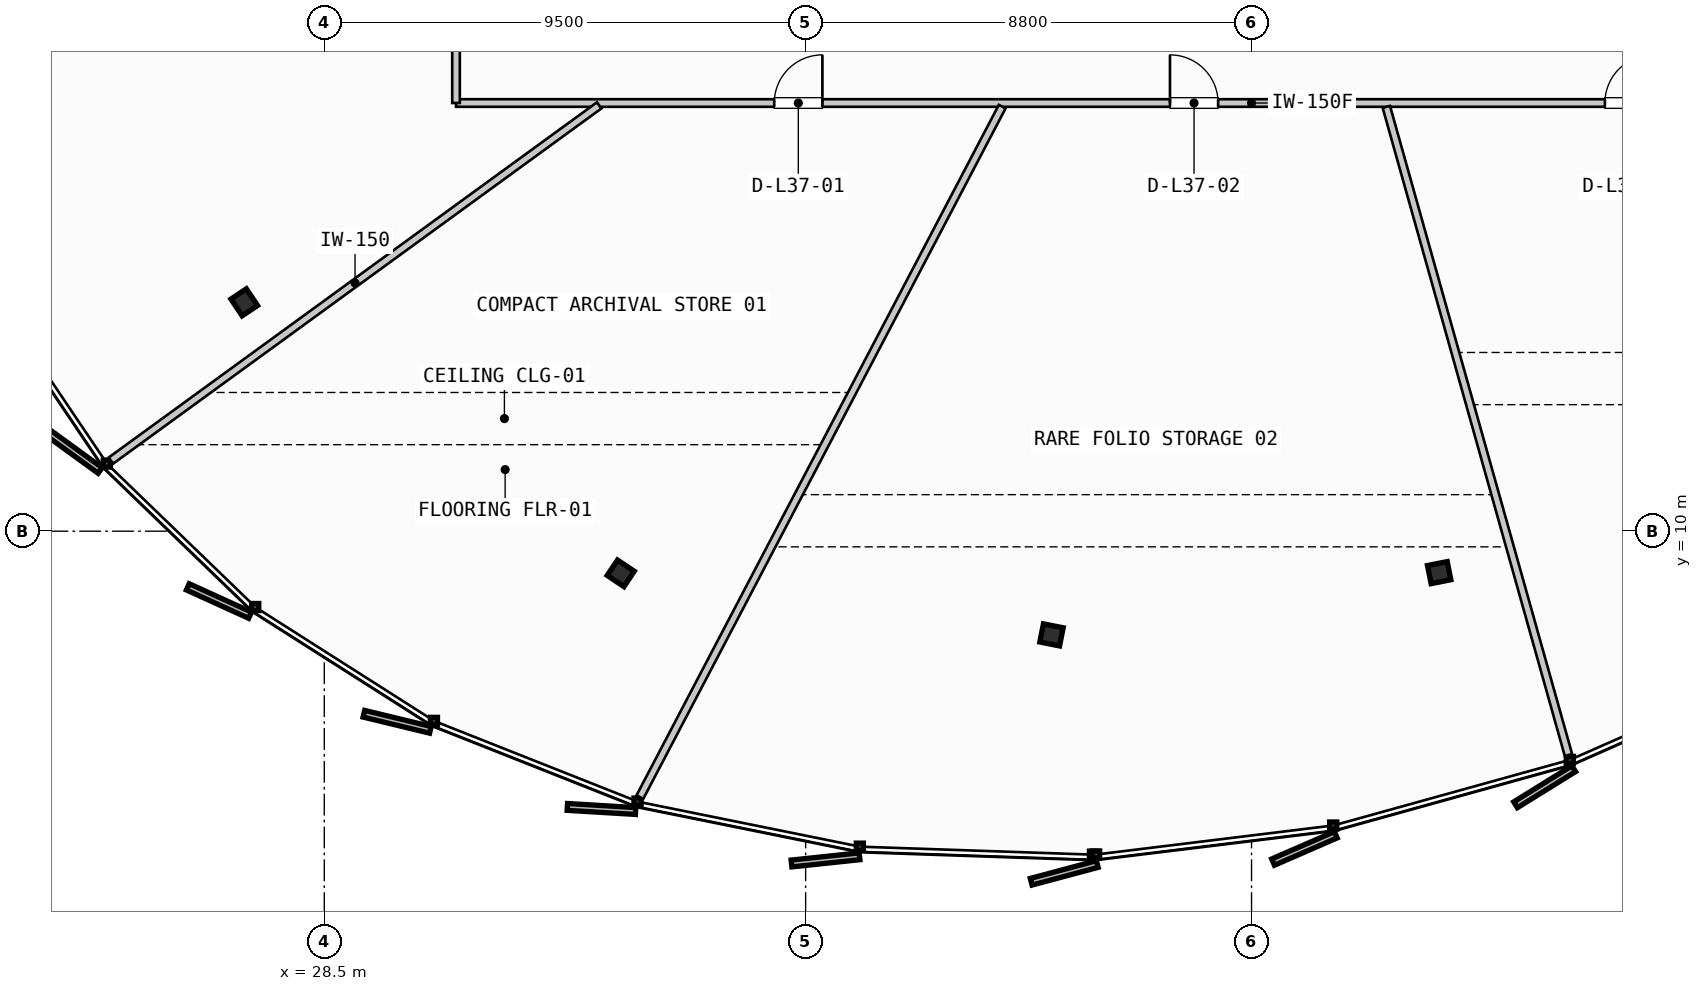
"""IFC4 building model, lengths in metres.
Left out: names, types, materials, properties, quantities, classifications, styles, units other than length and angle.
Written with IfcOpenShell. Run it as: python <this file> out.ifc"""

import sys

from ifc_helpers import new_model, si_unit, direction, frame, frame_2d, origin, origin_2d, place, context, subcontext, project, spatial, rectangle, i_section, extrude, source, transform, mapped, element, fill, save


model = new_model("IFC4")
c1 = context("Model", 3, precision=1e-05, world=origin(), true_north=direction((0.0, 1.0)))
c2 = subcontext(c1, "Body", "Model", "MODEL_VIEW")
j1 = project(units=[si_unit("LENGTHUNIT", "METRE"), si_unit("PLANEANGLEUNIT", "RADIAN")], contexts=[c1])
p1 = place(None, origin())
s1 = spatial("IfcSite", under=j1, at=p1, CompositionType="ELEMENT")
p2 = place(p1, origin())
s2 = spatial("IfcBuilding", under=s1, at=p2, CompositionType="ELEMENT")
p3 = place(p2, frame((0.0, 0.0, 146.55)))
s3 = spatial("IfcBuildingStorey", under=s2, at=p3, CompositionType="ELEMENT", Elevation=146.55)
m1 = source(origin(), c2, "Body", "SweptSolid", [
    extrude(i_section(OverallWidth=0.397, OverallDepth=0.365, WebThickness=0.028, FlangeThickness=0.044, FilletRadius=0.015, at=origin_2d()), origin(), (0.0, 0.0, 1.0), 3.3),
])
for number, where, z_axis, x_axis in (
    (1, (26.921, 14.517, 0.0), (0.0, 0.0, 1.0), (-0.831, -0.556, 0.0)),
    (2, (34.351, 9.168, 0.0), (0.0, 0.0, 1.0), (-0.556, -0.831, 0.0)),
    (3, (42.852, 7.954, 0.0), (0.0, 0.0, 1.0), (-0.195, -0.981, 0.0)),
    (4, (50.503, 9.182, 0.0), (0.0, 0.0, 1.0), (0.195, -0.981, 0.0)),
):
    element("IfcColumn", number, at=place(p3, frame(where, z_axis=z_axis, x_axis=x_axis)), inside=s3, PredefinedType="COLUMN", context=c2, shape_type="MappedRepresentation", body=[
        mapped(m1, transform((0.0, 0.0, 0.0), scale=1.0)),
    ])
p4 = place(p3, frame((31.1, 18.45, 0.0), z_axis=(0.0, 0.0, 1.0), x_axis=(1.0, 0.0, 0.0)))
e5 = element("IfcWall", 5, at=p4, inside=s3, PredefinedType="PARTITIONING", context=c2, shape_type="SweptSolid", body=[
    extrude(rectangle(XDim=31.4, YDim=0.15, at=frame_2d((15.7, 0.0))), origin(), (0.0, 0.0, 1.0), 2.305),
])
p5 = place(p4, frame((6.281, 0.0, 0.0)))
e6 = element("IfcOpeningElement", 6, at=p5, cuts=e5, PredefinedType="OPENING", context=c2, shape_type="SweptSolid", body=[
    extrude(rectangle(XDim=0.95, YDim=2.15, at=frame_2d((0.475, 1.075))), frame((0.0, 0.085, 0.0), z_axis=(0.0, -1.0, 0.0), x_axis=(1.0, 0.0, 0.0)), (0.0, 0.0, 1.0), 0.17),
])
p6 = place(p4, frame((14.09, 0.0, 0.0)))
e7 = element("IfcOpeningElement", 7, at=p6, cuts=e5, PredefinedType="OPENING", context=c2, shape_type="SweptSolid", body=[
    extrude(rectangle(XDim=0.95, YDim=2.15, at=frame_2d((0.475, 1.075))), frame((0.0, 0.085, 0.0), z_axis=(0.0, -1.0, 0.0), x_axis=(1.0, 0.0, 0.0)), (0.0, 0.0, 1.0), 0.17),
])
p7 = place(p4, frame((22.674, 0.0, 0.0)))
e8 = element("IfcOpeningElement", 8, at=p7, cuts=e5, PredefinedType="OPENING", context=c2, shape_type="SweptSolid", body=[
    extrude(rectangle(XDim=0.95, YDim=2.15, at=frame_2d((0.475, 1.075))), frame((0.0, 0.085, 0.0), z_axis=(0.0, -1.0, 0.0), x_axis=(1.0, 0.0, 0.0)), (0.0, 0.0, 1.0), 0.17),
])
p8 = place(p3, frame((31.1, 20.15, 0.0), z_axis=(0.0, 0.0, 1.0), x_axis=(0.0, -1.0, 0.0)))
e9 = element("IfcWall", 9, at=p8, inside=s3, PredefinedType="PARTITIONING", context=c2, shape_type="SweptSolid", body=[
    extrude(rectangle(XDim=1.7, YDim=0.15, at=frame_2d((0.85, 0.0))), origin(), (0.0, 0.0, 1.0), 2.305),
])
p9 = place(p3, frame((33.925, 18.403, 0.0), z_axis=(0.0, 0.0, 1.0), x_axis=(-0.808658108414, -0.588278899584, 0.0)))
e10 = element("IfcWall", 10, at=p9, inside=s3, PredefinedType="PARTITIONING", context=c2, shape_type="SweptSolid", body=[
    extrude(rectangle(XDim=11.916, YDim=0.15, at=frame_2d((5.958, 0.0))), origin(), (0.0, 0.0, 1.0), 2.305),
])
p10 = place(p3, frame((41.879, 18.379, 0.0), z_axis=(0.0, 0.0, 1.0), x_axis=(-0.464680296379, -0.885478527214, 0.0)))
e11 = element("IfcWall", 11, at=p10, inside=s3, PredefinedType="PARTITIONING", context=c2, shape_type="SweptSolid", body=[
    extrude(rectangle(XDim=15.389, YDim=0.15, at=frame_2d((7.694, 0.0))), origin(), (0.0, 0.0, 1.0), 2.305),
])
p11 = place(p3, frame((49.461, 18.373, 0.0), z_axis=(0.0, 0.0, 1.0), x_axis=(0.270512485331, -0.962716466713, 0.0)))
e12 = element("IfcWall", 12, at=p11, inside=s3, PredefinedType="PARTITIONING", context=c2, shape_type="SweptSolid", body=[
    extrude(rectangle(XDim=13.286, YDim=0.15, at=frame_2d((6.643, 0.0))), origin(), (0.0, 0.0, 1.0), 2.305),
])
m2 = source(origin(), c2, "Body", "SweptSolid", [
    extrude(rectangle(XDim=0.95, YDim=2.15, at=frame_2d((0.475, 1.075))), frame((0.0, 0.025, 0.0), z_axis=(0.0, -1.0, 0.0), x_axis=(1.0, 0.0, 0.0)), (0.0, 0.0, 1.0), 0.05),
])
p12 = place(p5, origin())
e13 = element("IfcDoor", 13, at=p12, inside=s3, OperationType="SINGLE_SWING_RIGHT", PredefinedType="DOOR", context=c2, shape_type="MappedRepresentation", body=[
    mapped(m2, transform((0.0, 0.0, 0.0), scale=1.0)),
])
fill(e6, e13)
p13 = place(p6, origin())
e14 = element("IfcDoor", 14, at=p13, inside=s3, OperationType="SINGLE_SWING_LEFT", PredefinedType="DOOR", context=c2, shape_type="MappedRepresentation", body=[
    mapped(m2, transform((0.0, 0.0, 0.0), scale=1.0)),
])
fill(e7, e14)
p14 = place(p7, origin())
e15 = element("IfcDoor", 15, at=p14, inside=s3, OperationType="SINGLE_SWING_RIGHT", PredefinedType="DOOR", context=c2, shape_type="MappedRepresentation", body=[
    mapped(m2, transform((0.0, 0.0, 0.0), scale=1.0)),
])
fill(e8, e15)
save(model, sys.argv[1])
